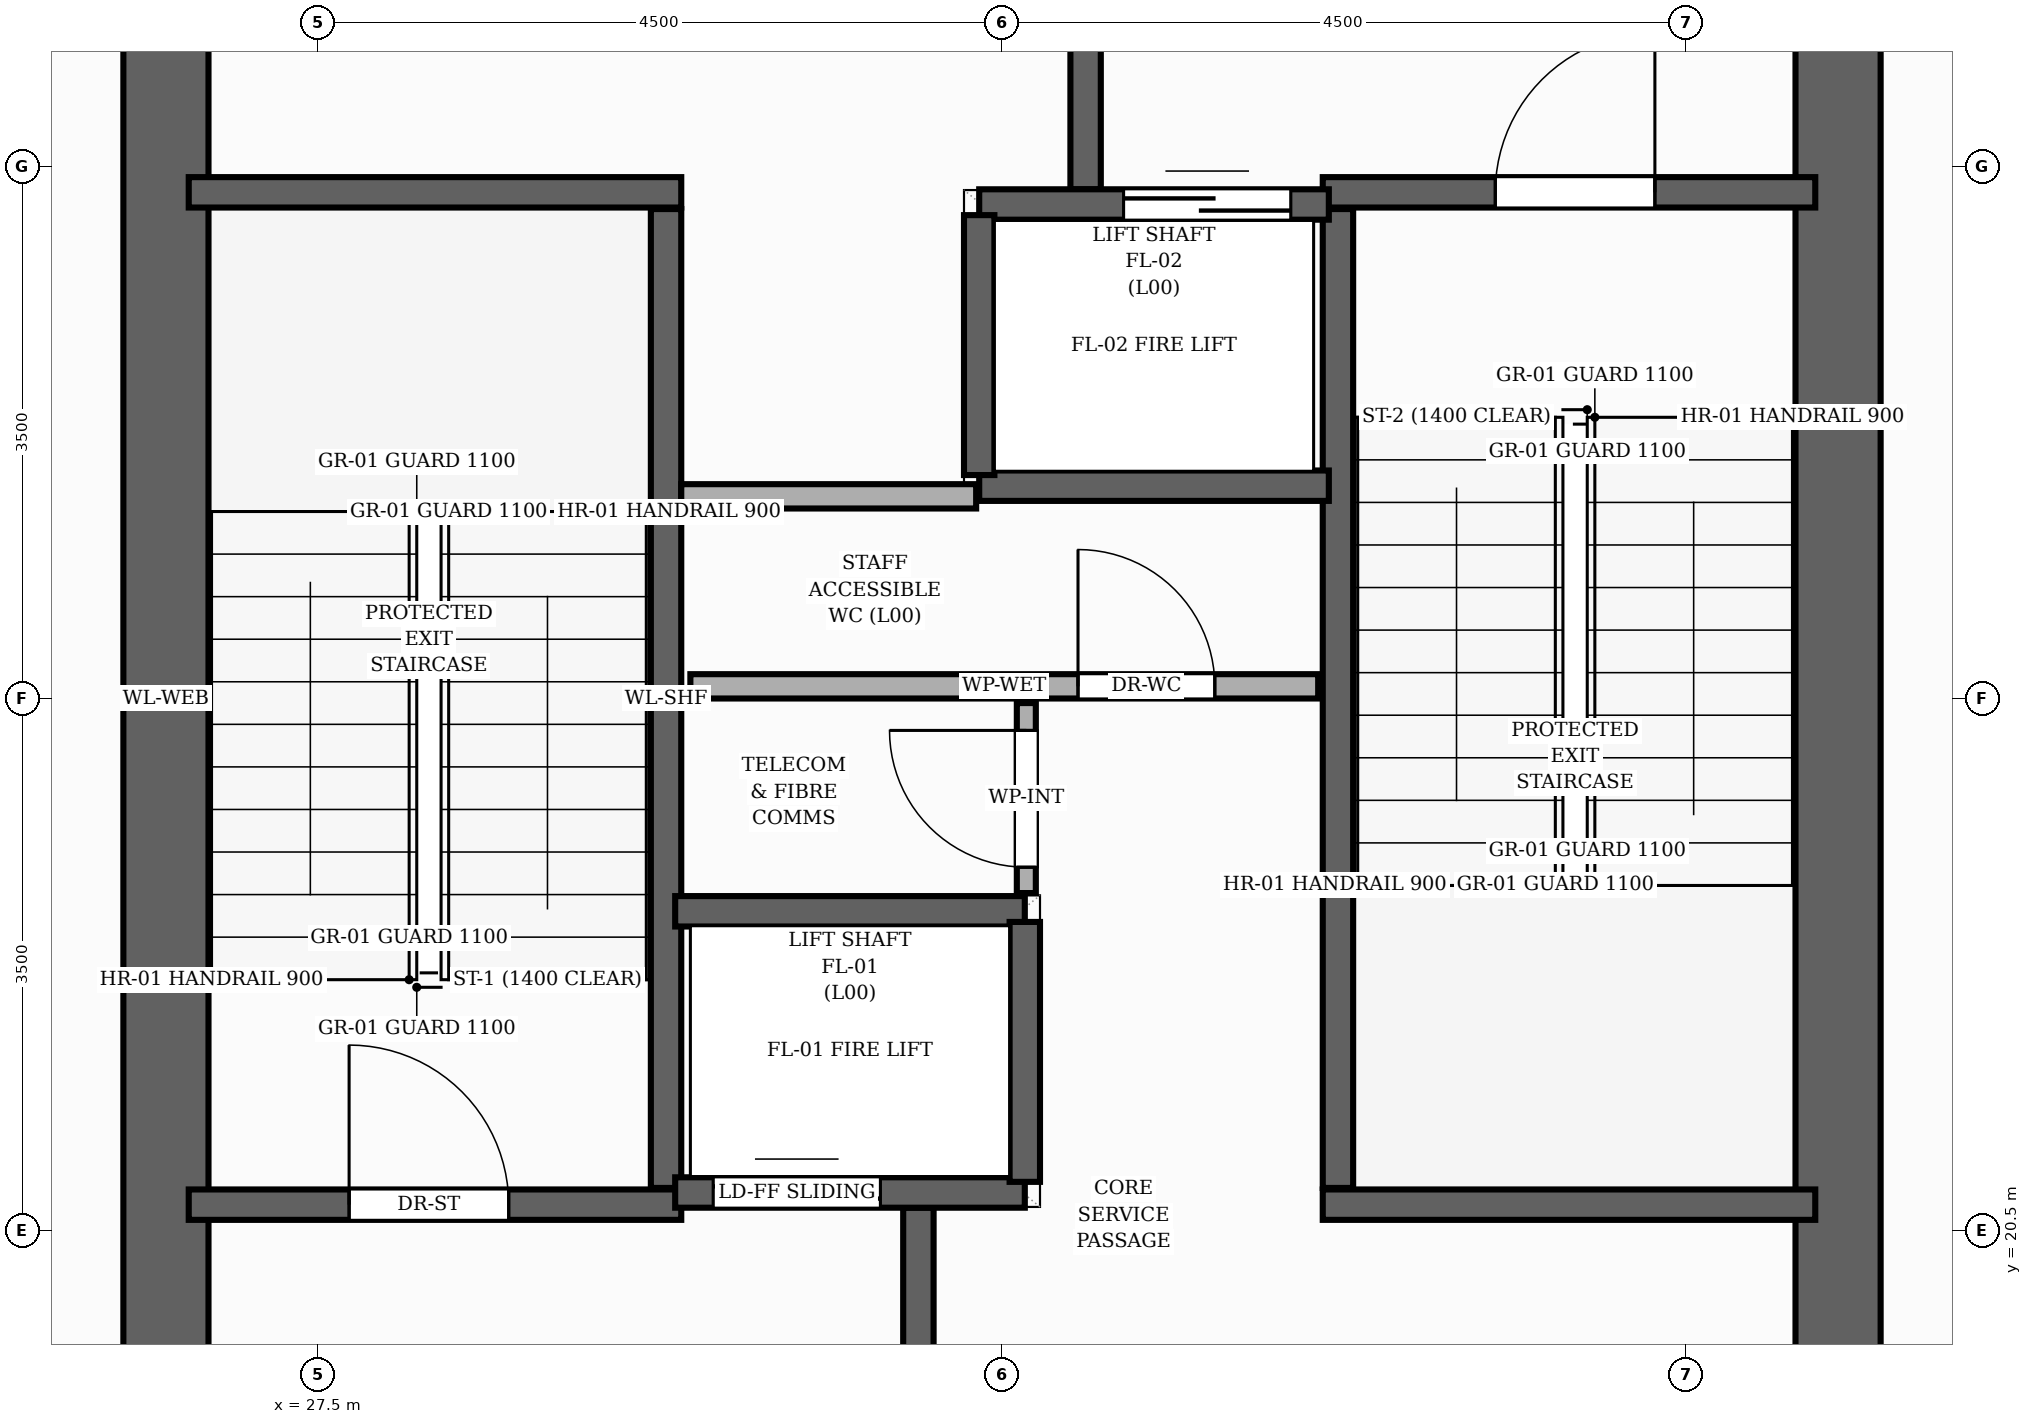
"""IFC4 building model, lengths in metres.
Left out: names, types, materials, properties, quantities, classifications, styles, units other than length and angle.
Written with IfcOpenShell. Run it as: python <this file> out.ifc"""

import sys

from ifc_helpers import new_model, si_unit, direction, frame, frame_2d, origin, place, context, subcontext, project, spatial, rectangle, extrude, element, fill, save


model = new_model("IFC4")
c1 = context("Model", 3, precision=1e-05, world=origin(), true_north=direction((0.0, 1.0)))
c2 = subcontext(c1, "Body", "Model", "MODEL_VIEW")
j1 = project(units=[si_unit("LENGTHUNIT", "METRE"), si_unit("PLANEANGLEUNIT", "RADIAN")], contexts=[c1])
p1 = place(None, origin())
s1 = spatial("IfcSite", under=j1, at=p1, CompositionType="ELEMENT")
p2 = place(p1, origin())
s2 = spatial("IfcBuilding", under=s1, at=p2, CompositionType="ELEMENT")
p3 = place(p2, origin())
s3 = spatial("IfcBuildingStorey", under=s2, at=p3, CompositionType="ELEMENT", Elevation=0.0)
for number, where, z_axis, x_axis in (
    (1, (26.5, 17.4, 0.0), (0.0, 0.0, 1.0), (0.0, 1.0, 0.0)),
    (2, (37.5, 17.4, 0.0), (0.0, 0.0, 1.0), (0.0, 1.0, 0.0)),
):
    element("IfcWall", number, at=place(p3, frame(where, z_axis=z_axis, x_axis=x_axis)), inside=s3, PredefinedType="SHEAR", context=c2, shape_type="SweptSolid", body=[
        extrude(rectangle(XDim=13.2, YDim=0.56, at=frame_2d((6.6, 0.0))), origin(), (0.0, 0.0, 1.0), 4.0),
    ])
p4 = place(p3, frame((29.79, 20.78, 0.0), z_axis=(0.0, 0.0, 1.0), x_axis=(0.0, 1.0, 0.0)))
e3 = element("IfcWall", 3, at=p4, inside=s3, PredefinedType="SHEAR", context=c2, shape_type="SweptSolid", body=[
    extrude(rectangle(XDim=6.44, YDim=0.2, at=frame_2d((3.22, 0.0))), origin(), (0.0, 0.0, 1.0), 4.0),
])
p5 = place(p3, frame((26.65, 27.33, 0.0), z_axis=(0.0, 0.0, 1.0), x_axis=(1.0, 0.0, 0.0)))
e4 = element("IfcWall", 4, at=p5, inside=s3, PredefinedType="SHEAR", context=c2, shape_type="SweptSolid", body=[
    extrude(rectangle(XDim=3.24, YDim=0.2, at=frame_2d((1.62, 0.0))), origin(), (0.0, 0.0, 1.0), 4.0),
])
p6 = place(p3, frame((26.65, 20.67, 0.0), z_axis=(0.0, 0.0, 1.0), x_axis=(1.0, 0.0, 0.0)))
e5 = element("IfcWall", 5, at=p6, inside=s3, PredefinedType="SHEAR", context=c2, shape_type="SweptSolid", body=[
    extrude(rectangle(XDim=3.24, YDim=0.2, at=frame_2d((1.62, 0.0))), origin(), (0.0, 0.0, 1.0), 4.0),
])
p7 = place(p6, frame((1.055, 0.0, 0.0)))
e6 = element("IfcOpeningElement", 6, at=p7, cuts=e5, PredefinedType="OPENING", context=c2, shape_type="SweptSolid", body=[
    extrude(rectangle(XDim=1.05, YDim=2.15, at=frame_2d((0.525, 1.075))), frame((0.0, 0.11, 0.0), z_axis=(0.0, -1.0, 0.0), x_axis=(1.0, 0.0, 0.0)), (0.0, 0.0, 1.0), 0.22),
])
p8 = place(p3, frame((34.21, 20.78, 0.0), z_axis=(0.0, 0.0, 1.0), x_axis=(0.0, 1.0, 0.0)))
e7 = element("IfcWall", 7, at=p8, inside=s3, PredefinedType="SHEAR", context=c2, shape_type="SweptSolid", body=[
    extrude(rectangle(XDim=6.44, YDim=0.2, at=frame_2d((3.22, 0.0))), origin(), (0.0, 0.0, 1.0), 4.0),
])
p9 = place(p3, frame((34.11, 20.67, 0.0), z_axis=(0.0, 0.0, 1.0), x_axis=(1.0, 0.0, 0.0)))
e8 = element("IfcWall", 8, at=p9, inside=s3, PredefinedType="SHEAR", context=c2, shape_type="SweptSolid", body=[
    extrude(rectangle(XDim=3.24, YDim=0.2, at=frame_2d((1.62, 0.0))), origin(), (0.0, 0.0, 1.0), 4.0),
])
p10 = place(p3, frame((34.11, 27.33, 0.0), z_axis=(0.0, 0.0, 1.0), x_axis=(1.0, 0.0, 0.0)))
e9 = element("IfcWall", 9, at=p10, inside=s3, PredefinedType="SHEAR", context=c2, shape_type="SweptSolid", body=[
    extrude(rectangle(XDim=3.24, YDim=0.2, at=frame_2d((1.62, 0.0))), origin(), (0.0, 0.0, 1.0), 4.0),
])
p11 = place(p10, frame((1.135, 0.0, 0.0)))
e10 = element("IfcOpeningElement", 10, at=p11, cuts=e9, PredefinedType="OPENING", context=c2, shape_type="SweptSolid", body=[
    extrude(rectangle(XDim=1.05, YDim=2.15, at=frame_2d((0.525, 1.075))), frame((0.0, 0.11, 0.0), z_axis=(0.0, -1.0, 0.0), x_axis=(1.0, 0.0, 0.0)), (0.0, 0.0, 1.0), 0.22),
])
for number, where, z_axis, x_axis in (
    (11, (31.45, 17.15, 0.0), (0.0, 0.0, 1.0), (0.0, 1.0, 0.0)),
    (12, (32.55, 27.35, 0.0), (0.0, 0.0, 1.0), (0.0, 1.0, 0.0)),
):
    element("IfcWall", number, at=place(p3, frame(where, z_axis=z_axis, x_axis=x_axis)), inside=s3, PredefinedType="SHEAR", context=c2, shape_type="SweptSolid", body=[
        extrude(rectangle(XDim=3.5, YDim=0.2, at=frame_2d((1.75, 0.0))), origin(), (0.0, 0.0, 1.0), 4.0),
    ])
p12 = place(p3, frame((29.85, 20.75, 0.0), z_axis=(0.0, 0.0, 1.0), x_axis=(1.0, 0.0, 0.0)))
e13 = element("IfcWall", 13, at=p12, inside=s3, PredefinedType="SHEAR", context=c2, shape_type="SweptSolid", body=[
    extrude(rectangle(XDim=2.3, YDim=0.2, at=frame_2d((1.15, 0.0))), origin(), (0.0, 0.0, 1.0), 4.0),
])
p13 = place(p12, frame((0.25, 0.0, 0.0)))
e14 = element("IfcOpeningElement", 14, at=p13, cuts=e13, PredefinedType="OPENING", context=c2, shape_type="SweptSolid", body=[
    extrude(rectangle(XDim=1.1, YDim=2.15, at=frame_2d((0.55, 1.075))), frame((0.0, 0.11, 0.0), z_axis=(0.0, -1.0, 0.0), x_axis=(1.0, 0.0, 0.0)), (0.0, 0.0, 1.0), 0.22),
])
p14 = place(p3, frame((29.85, 22.6, 0.0), z_axis=(0.0, 0.0, 1.0), x_axis=(1.0, 0.0, 0.0)))
e15 = element("IfcWall", 15, at=p14, inside=s3, PredefinedType="SHEAR", context=c2, shape_type="SweptSolid", body=[
    extrude(rectangle(XDim=2.3, YDim=0.2, at=frame_2d((1.15, 0.0))), origin(), (0.0, 0.0, 1.0), 4.0),
])
p15 = place(p3, frame((32.15, 20.82, 0.0), z_axis=(0.0, 0.0, 1.0), x_axis=(0.0, 1.0, 0.0)))
e16 = element("IfcWall", 16, at=p15, inside=s3, PredefinedType="SHEAR", context=c2, shape_type="SweptSolid", body=[
    extrude(rectangle(XDim=1.71, YDim=0.2, at=frame_2d((0.855, 0.0))), origin(), (0.0, 0.0, 1.0), 4.0),
])
p16 = place(p3, frame((31.85, 27.25, 0.0), z_axis=(0.0, 0.0, 1.0), x_axis=(1.0, 0.0, 0.0)))
e17 = element("IfcWall", 17, at=p16, inside=s3, PredefinedType="SHEAR", context=c2, shape_type="SweptSolid", body=[
    extrude(rectangle(XDim=2.3, YDim=0.2, at=frame_2d((1.15, 0.0))), origin(), (0.0, 0.0, 1.0), 4.0),
])
p17 = place(p16, frame((0.95, 0.0, 0.0)))
e18 = element("IfcOpeningElement", 18, at=p17, cuts=e17, PredefinedType="OPENING", context=c2, shape_type="SweptSolid", body=[
    extrude(rectangle(XDim=1.1, YDim=2.15, at=frame_2d((0.55, 1.075))), frame((0.0, 0.11, 0.0), z_axis=(0.0, -1.0, 0.0), x_axis=(1.0, 0.0, 0.0)), (0.0, 0.0, 1.0), 0.22),
])
p18 = place(p3, frame((31.85, 25.4, 0.0), z_axis=(0.0, 0.0, 1.0), x_axis=(1.0, 0.0, 0.0)))
e19 = element("IfcWall", 19, at=p18, inside=s3, PredefinedType="SHEAR", context=c2, shape_type="SweptSolid", body=[
    extrude(rectangle(XDim=2.3, YDim=0.2, at=frame_2d((1.15, 0.0))), origin(), (0.0, 0.0, 1.0), 4.0),
])
p19 = place(p3, frame((31.85, 25.47, 0.0), z_axis=(0.0, 0.0, 1.0), x_axis=(0.0, 1.0, 0.0)))
e20 = element("IfcWall", 20, at=p19, inside=s3, PredefinedType="SHEAR", context=c2, shape_type="SweptSolid", body=[
    extrude(rectangle(XDim=1.71, YDim=0.2, at=frame_2d((0.855, 0.0))), origin(), (0.0, 0.0, 1.0), 4.0),
])
p20 = place(p3, frame((29.95, 24.08, 0.0), z_axis=(0.0, 0.0, 1.0), x_axis=(1.0, 0.0, 0.0)))
e21 = element("IfcWall", 21, at=p20, inside=s3, PredefinedType="PLUMBINGWALL", context=c2, shape_type="SweptSolid", body=[
    extrude(rectangle(XDim=4.13, YDim=0.16, at=frame_2d((2.065, 0.0))), origin(), (0.0, 0.0, 1.0), 3.715),
])
p21 = place(p20, frame((2.55, 0.0, 0.0)))
e22 = element("IfcOpeningElement", 22, at=p21, cuts=e21, PredefinedType="OPENING", context=c2, shape_type="SweptSolid", body=[
    extrude(rectangle(XDim=0.9, YDim=2.1, at=frame_2d((0.45, 1.05))), frame((0.0, 0.09, 0.0), z_axis=(0.0, -1.0, 0.0), x_axis=(1.0, 0.0, 0.0)), (0.0, 0.0, 1.0), 0.18),
])
p22 = place(p3, frame((32.16, 22.72, 0.0), z_axis=(0.0, 0.0, 1.0), x_axis=(0.0, 1.0, 0.0)))
e23 = element("IfcWall", 23, at=p22, inside=s3, PredefinedType="PARTITIONING", context=c2, shape_type="SweptSolid", body=[
    extrude(rectangle(XDim=1.25, YDim=0.125, at=frame_2d((0.625, 0.0))), origin(), (0.0, 0.0, 1.0), 3.715),
])
p23 = place(p22, frame((0.17, 0.0, 0.0)))
e24 = element("IfcOpeningElement", 24, at=p23, cuts=e23, PredefinedType="OPENING", context=c2, shape_type="SweptSolid", body=[
    extrude(rectangle(XDim=0.9, YDim=2.1, at=frame_2d((0.45, 1.05))), frame((0.0, 0.073, 0.0), z_axis=(0.0, -1.0, 0.0), x_axis=(1.0, 0.0, 0.0)), (0.0, 0.0, 1.0), 0.145),
])
p24 = place(p3, frame((29.89, 25.33, 0.0), z_axis=(0.0, 0.0, 1.0), x_axis=(1.0, 0.0, 0.0)))
e25 = element("IfcWall", 25, at=p24, inside=s3, PredefinedType="PLUMBINGWALL", context=c2, shape_type="SweptSolid", body=[
    extrude(rectangle(XDim=1.94, YDim=0.16, at=frame_2d((0.97, 0.0))), origin(), (0.0, 0.0, 1.0), 3.715),
])
p25 = place(p7, origin())
e26 = element("IfcDoor", 26, at=p25, inside=s3, OperationType="SINGLE_SWING_LEFT", PredefinedType="DOOR", context=c2, shape_type="SweptSolid", body=[
    extrude(rectangle(XDim=1.05, YDim=2.15, at=frame_2d((0.525, 1.075))), frame((0.0, 0.025, 0.0), z_axis=(0.0, -1.0, 0.0), x_axis=(1.0, 0.0, 0.0)), (0.0, 0.0, 1.0), 0.05),
])
fill(e6, e26)
p26 = place(p11, origin())
e27 = element("IfcDoor", 27, at=p26, inside=s3, OperationType="SINGLE_SWING_RIGHT", PredefinedType="DOOR", context=c2, shape_type="SweptSolid", body=[
    extrude(rectangle(XDim=1.05, YDim=2.15, at=frame_2d((0.525, 1.075))), frame((0.0, 0.025, 0.0), z_axis=(0.0, -1.0, 0.0), x_axis=(1.0, 0.0, 0.0)), (0.0, 0.0, 1.0), 0.05),
])
fill(e10, e27)
p27 = place(p13, origin())
e28 = element("IfcDoor", 28, at=p27, inside=s3, OperationType="DOUBLE_DOOR_SLIDING", PredefinedType="DOOR", context=c2, shape_type="SweptSolid", body=[
    extrude(rectangle(XDim=1.1, YDim=2.15, at=frame_2d((0.55, 1.075))), frame((0.0, 0.025, 0.0), z_axis=(0.0, -1.0, 0.0), x_axis=(1.0, 0.0, 0.0)), (0.0, 0.0, 1.0), 0.05),
])
fill(e14, e28)
p28 = place(p17, origin())
e29 = element("IfcDoor", 29, at=p28, inside=s3, OperationType="DOUBLE_DOOR_SLIDING", PredefinedType="DOOR", context=c2, shape_type="SweptSolid", body=[
    extrude(rectangle(XDim=1.1, YDim=2.15, at=frame_2d((0.55, 1.075))), frame((0.0, 0.025, 0.0), z_axis=(0.0, -1.0, 0.0), x_axis=(1.0, 0.0, 0.0)), (0.0, 0.0, 1.0), 0.05),
])
fill(e18, e29)
p29 = place(p21, origin())
e30 = element("IfcDoor", 30, at=p29, inside=s3, OperationType="SINGLE_SWING_LEFT", PredefinedType="DOOR", context=c2, shape_type="SweptSolid", body=[
    extrude(rectangle(XDim=0.9, YDim=2.1, at=frame_2d((0.45, 1.05))), frame((0.0, 0.025, 0.0), z_axis=(0.0, -1.0, 0.0), x_axis=(1.0, 0.0, 0.0)), (0.0, 0.0, 1.0), 0.05),
])
fill(e22, e30)
p30 = place(p23, origin())
e31 = element("IfcDoor", 31, at=p30, inside=s3, OperationType="SINGLE_SWING_RIGHT", PredefinedType="DOOR", context=c2, shape_type="SweptSolid", body=[
    extrude(rectangle(XDim=0.9, YDim=2.1, at=frame_2d((0.45, 1.05))), frame((0.0, 0.025, 0.0), z_axis=(0.0, -1.0, 0.0), x_axis=(1.0, 0.0, 0.0)), (0.0, 0.0, 1.0), 0.05),
])
fill(e24, e31)
save(model, sys.argv[1])
